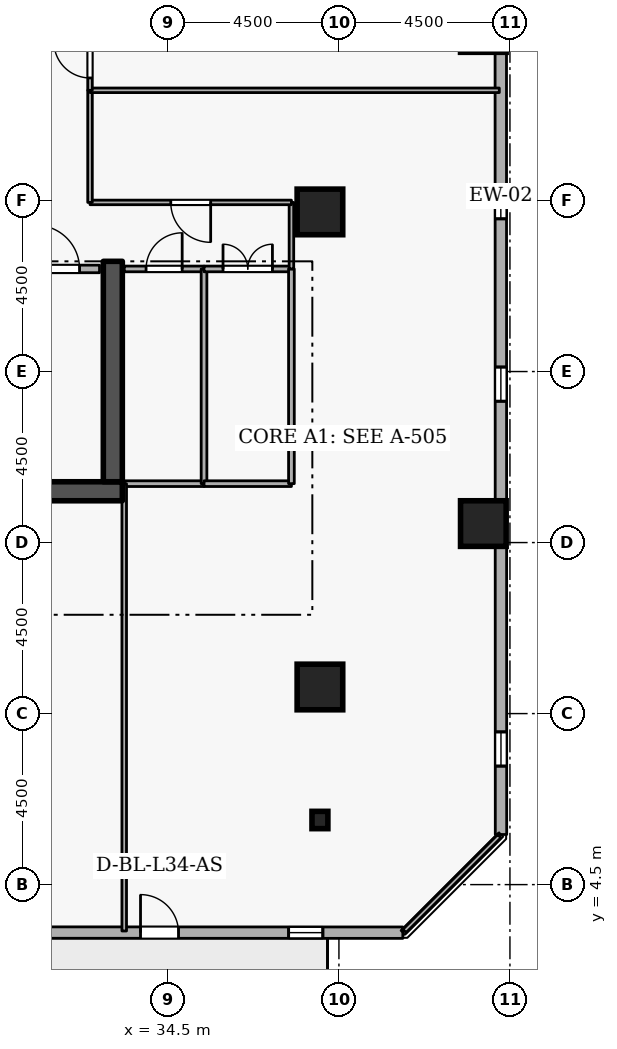
"""IFC4 building model, lengths in metres.
Left out: names, types, materials, properties, quantities, classifications, styles, units other than length and angle.
Written with IfcOpenShell. Run it as: python <this file> out.ifc"""

import sys

from ifc_helpers import new_model, si_unit, direction, frame, frame_2d, origin, origin_2d, place, context, subcontext, project, spatial, rectangle, i_section, extrude, element, fill, save


model = new_model("IFC4")
c1 = context("Model", 3, precision=1e-05, world=origin(), true_north=direction((0.0, 1.0)))
c2 = subcontext(c1, "Body", "Model", "MODEL_VIEW")
j1 = project(units=[si_unit("LENGTHUNIT", "METRE"), si_unit("PLANEANGLEUNIT", "RADIAN")], contexts=[c1])
p1 = place(None, origin())
s1 = spatial("IfcSite", under=j1, at=p1, CompositionType="ELEMENT")
p2 = place(p1, origin())
s2 = spatial("IfcBuilding", under=s1, at=p2, CompositionType="ELEMENT")
p3 = place(p2, frame((0.0, 0.0, 130.5)))
s3 = spatial("IfcBuildingStorey", under=s2, at=p3, CompositionType="ELEMENT", Elevation=130.5)
p4 = place(p3, frame((17.7, 14.85, 0.0), z_axis=(0.0, 0.0, 1.0), x_axis=(1.0, 0.0, 0.0)))
e1 = element("IfcWall", 1, at=p4, inside=s3, PredefinedType="SHEAR", context=c2, shape_type="SweptSolid", body=[
    extrude(rectangle(XDim=15.6, YDim=0.5, at=frame_2d((7.8, 0.0))), origin(), (0.0, 0.0, 1.0), 3.6),
])
p5 = place(p3, frame((33.05, 15.1, 0.0), z_axis=(0.0, 0.0, 1.0), x_axis=(0.0, 1.0, 0.0)))
e2 = element("IfcWall", 2, at=p5, inside=s3, PredefinedType="SHEAR", context=c2, shape_type="SweptSolid", body=[
    extrude(rectangle(XDim=5.8, YDim=0.5, at=frame_2d((2.9, 0.0))), origin(), (0.0, 0.0, 1.0), 3.6),
])
for number, where, z_axis, x_axis in (
    (3, (38.5, 9.7, 0.0), (0.0, 0.0, 1.0), (1.0, 0.0, 0.0)),
    (4, (42.8, 14.0, 0.0), (0.0, 0.0, 1.0), (1.0, 0.0, 0.0)),
    (5, (38.5, 22.2, 0.0), (0.0, 0.0, 1.0), (1.0, 0.0, 0.0)),
):
    element("IfcColumn", number, at=place(p3, frame(where, z_axis=z_axis, x_axis=x_axis)), inside=s3, PredefinedType="COLUMN", context=c2, shape_type="SweptSolid", body=[
        extrude(rectangle(XDim=1.2, YDim=1.2, at=origin_2d()), origin(), (0.0, 0.0, 1.0), 3.6),
    ])
p6 = place(p3, frame((38.5, 6.2, 0.0), z_axis=(0.0, 0.0, 1.0), x_axis=(1.0, 0.0, 0.0)))
e6 = element("IfcColumn", 6, at=p6, inside=s3, PredefinedType="COLUMN", context=c2, shape_type="SweptSolid", body=[
    extrude(i_section(OverallWidth=0.418, OverallDepth=0.456, WebThickness=0.042, FlangeThickness=0.067, FilletRadius=0.015, at=origin_2d()), origin(), (0.0, 0.0, 1.0), 3.6),
])
p7 = place(p3, frame((7.076, 3.244, 0.0), z_axis=(0.0, 0.0, 1.0), x_axis=(0.999999963872, -0.000268805477, 0.0)))
e7 = element("IfcWall", 7, at=p7, inside=s3, PredefinedType="STANDARD", context=c2, shape_type="SweptSolid", body=[
    extrude(rectangle(XDim=33.605, YDim=0.3, at=frame_2d((16.802, 0.0))), origin(), (0.0, 0.0, 1.0), 2.7),
])
p8 = place(p7, frame((26.702, 0.0, 0.0)))
e8 = element("IfcOpeningElement", 8, at=p8, cuts=e7, PredefinedType="OPENING", context=c2, shape_type="SweptSolid", body=[
    extrude(rectangle(XDim=1.0, YDim=2.08, at=frame_2d((0.5, 1.04))), frame((0.0, 0.16, 0.0), z_axis=(0.0, -1.0, 0.0), x_axis=(1.0, 0.0, 0.0)), (0.0, 0.0, 1.0), 0.32),
])
p9 = place(p7, frame((1.8, 0.0, 0.72)))
e9 = element("IfcOpeningElement", 9, at=p9, cuts=e7, PredefinedType="OPENING", context=c2, shape_type="SweptSolid", body=[
    extrude(rectangle(XDim=0.9, YDim=1.75, at=frame_2d((0.45, 0.875))), frame((0.0, 0.16, 0.0), z_axis=(0.0, -1.0, 0.0), x_axis=(1.0, 0.0, 0.0)), (0.0, 0.0, 1.0), 0.32),
])
p10 = place(p7, frame((6.6, 0.0, 0.72)))
e10 = element("IfcOpeningElement", 10, at=p10, cuts=e7, PredefinedType="OPENING", context=c2, shape_type="SweptSolid", body=[
    extrude(rectangle(XDim=0.9, YDim=1.75, at=frame_2d((0.45, 0.875))), frame((0.0, 0.16, 0.0), z_axis=(0.0, -1.0, 0.0), x_axis=(1.0, 0.0, 0.0)), (0.0, 0.0, 1.0), 0.32),
])
p11 = place(p7, frame((11.4, 0.0, 0.72)))
e11 = element("IfcOpeningElement", 11, at=p11, cuts=e7, PredefinedType="OPENING", context=c2, shape_type="SweptSolid", body=[
    extrude(rectangle(XDim=0.9, YDim=1.75, at=frame_2d((0.45, 0.875))), frame((0.0, 0.16, 0.0), z_axis=(0.0, -1.0, 0.0), x_axis=(1.0, 0.0, 0.0)), (0.0, 0.0, 1.0), 0.32),
])
p12 = place(p7, frame((16.2, 0.0, 0.72)))
e12 = element("IfcOpeningElement", 12, at=p12, cuts=e7, PredefinedType="OPENING", context=c2, shape_type="SweptSolid", body=[
    extrude(rectangle(XDim=0.9, YDim=1.75, at=frame_2d((0.45, 0.875))), frame((0.0, 0.16, 0.0), z_axis=(0.0, -1.0, 0.0), x_axis=(1.0, 0.0, 0.0)), (0.0, 0.0, 1.0), 0.32),
])
p13 = place(p7, frame((21.0, 0.0, 0.72)))
e13 = element("IfcOpeningElement", 13, at=p13, cuts=e7, PredefinedType="OPENING", context=c2, shape_type="SweptSolid", body=[
    extrude(rectangle(XDim=0.9, YDim=1.75, at=frame_2d((0.45, 0.875))), frame((0.0, 0.16, 0.0), z_axis=(0.0, -1.0, 0.0), x_axis=(1.0, 0.0, 0.0)), (0.0, 0.0, 1.0), 0.32),
])
p14 = place(p7, frame((30.6, 0.0, 0.72)))
e14 = element("IfcOpeningElement", 14, at=p14, cuts=e7, PredefinedType="OPENING", context=c2, shape_type="SweptSolid", body=[
    extrude(rectangle(XDim=0.9, YDim=1.75, at=frame_2d((0.45, 0.875))), frame((0.0, 0.16, 0.0), z_axis=(0.0, -1.0, 0.0), x_axis=(1.0, 0.0, 0.0)), (0.0, 0.0, 1.0), 0.32),
])
p15 = place(p3, frame((43.265, 5.819, 0.0), z_axis=(0.0, 0.0, 1.0), x_axis=(-0.000268805477, 0.999999963872, 0.0)))
e15 = element("IfcWall", 15, at=p15, inside=s3, PredefinedType="STANDARD", context=c2, shape_type="SweptSolid", body=[
    extrude(rectangle(XDim=33.605, YDim=0.3, at=frame_2d((16.802, 0.0))), origin(), (0.0, 0.0, 1.0), 2.7),
])
p16 = place(p15, frame((1.8, 0.0, 0.72)))
e16 = element("IfcOpeningElement", 16, at=p16, cuts=e15, PredefinedType="OPENING", context=c2, shape_type="SweptSolid", body=[
    extrude(rectangle(XDim=0.9, YDim=1.75, at=frame_2d((0.45, 0.875))), frame((0.0, 0.16, 0.0), z_axis=(0.0, -1.0, 0.0), x_axis=(1.0, 0.0, 0.0)), (0.0, 0.0, 1.0), 0.32),
])
p17 = place(p15, frame((11.4, 0.0, 0.72)))
e17 = element("IfcOpeningElement", 17, at=p17, cuts=e15, PredefinedType="OPENING", context=c2, shape_type="SweptSolid", body=[
    extrude(rectangle(XDim=0.9, YDim=1.75, at=frame_2d((0.45, 0.875))), frame((0.0, 0.16, 0.0), z_axis=(0.0, -1.0, 0.0), x_axis=(1.0, 0.0, 0.0)), (0.0, 0.0, 1.0), 0.32),
])
p18 = place(p15, frame((16.2, 0.0, 0.72)))
e18 = element("IfcOpeningElement", 18, at=p18, cuts=e15, PredefinedType="OPENING", context=c2, shape_type="SweptSolid", body=[
    extrude(rectangle(XDim=0.9, YDim=1.75, at=frame_2d((0.45, 0.875))), frame((0.0, 0.16, 0.0), z_axis=(0.0, -1.0, 0.0), x_axis=(1.0, 0.0, 0.0)), (0.0, 0.0, 1.0), 0.32),
])
p19 = place(p15, frame((25.8, 0.0, 0.72)))
e19 = element("IfcOpeningElement", 19, at=p19, cuts=e15, PredefinedType="OPENING", context=c2, shape_type="SweptSolid", body=[
    extrude(rectangle(XDim=0.9, YDim=1.75, at=frame_2d((0.45, 0.875))), frame((0.0, 0.16, 0.0), z_axis=(0.0, -1.0, 0.0), x_axis=(1.0, 0.0, 0.0)), (0.0, 0.0, 1.0), 0.32),
])
p20 = place(p15, frame((30.6, 0.0, 0.72)))
e20 = element("IfcOpeningElement", 20, at=p20, cuts=e15, PredefinedType="OPENING", context=c2, shape_type="SweptSolid", body=[
    extrude(rectangle(XDim=0.9, YDim=1.75, at=frame_2d((0.45, 0.875))), frame((0.0, 0.16, 0.0), z_axis=(0.0, -1.0, 0.0), x_axis=(1.0, 0.0, 0.0)), (0.0, 0.0, 1.0), 0.32),
])
p21 = place(p3, frame((30.5, 20.7, 0.0), z_axis=(0.0, 0.0, 1.0), x_axis=(1.0, 0.0, 0.0)))
e21 = element("IfcWall", 21, at=p21, inside=s3, PredefinedType="STANDARD", context=c2, shape_type="SweptSolid", body=[
    extrude(rectangle(XDim=2.2, YDim=0.2, at=frame_2d((1.1, 0.0))), origin(), (0.0, 0.0, 1.0), 3.34),
])
p22 = place(p21, frame((0.525, 0.0, 0.0)))
e22 = element("IfcOpeningElement", 22, at=p22, cuts=e21, PredefinedType="OPENING", context=c2, shape_type="SweptSolid", body=[
    extrude(rectangle(XDim=1.15, YDim=2.1, at=frame_2d((0.575, 1.05))), frame((0.0, 0.11, 0.0), z_axis=(0.0, -1.0, 0.0), x_axis=(1.0, 0.0, 0.0)), (0.0, 0.0, 1.0), 0.22),
])
p23 = place(p3, frame((35.45, 15.05, 0.0), z_axis=(0.0, 0.0, 1.0), x_axis=(-1.0, 0.0, 0.0)))
e23 = element("IfcWall", 23, at=p23, inside=s3, PredefinedType="PARTITIONING", context=c2, shape_type="SweptSolid", body=[
    extrude(rectangle(XDim=2.1, YDim=0.15, at=frame_2d((1.05, 0.0))), origin(), (0.0, 0.0, 1.0), 3.34),
])
p24 = place(p3, frame((33.35, 20.7, 0.0), z_axis=(0.0, 0.0, 1.0), x_axis=(1.0, 0.0, 0.0)))
e24 = element("IfcWall", 24, at=p24, inside=s3, PredefinedType="PARTITIONING", context=c2, shape_type="SweptSolid", body=[
    extrude(rectangle(XDim=2.1, YDim=0.15, at=frame_2d((1.05, 0.0))), origin(), (0.0, 0.0, 1.0), 3.34),
])
p25 = place(p24, frame((0.575, 0.0, 0.0)))
e25 = element("IfcOpeningElement", 25, at=p25, cuts=e24, PredefinedType="OPENING", context=c2, shape_type="SweptSolid", body=[
    extrude(rectangle(XDim=0.95, YDim=2.1, at=frame_2d((0.475, 1.05))), frame((0.0, 0.085, 0.0), z_axis=(0.0, -1.0, 0.0), x_axis=(1.0, 0.0, 0.0)), (0.0, 0.0, 1.0), 0.17),
])
p26 = place(p3, frame((35.45, 20.7, 0.0), z_axis=(0.0, 0.0, 1.0), x_axis=(0.0, -1.0, 0.0)))
e26 = element("IfcWall", 26, at=p26, inside=s3, PredefinedType="PARTITIONING", context=c2, shape_type="SweptSolid", body=[
    extrude(rectangle(XDim=5.65, YDim=0.15, at=frame_2d((2.825, 0.0))), origin(), (0.0, 0.0, 1.0), 3.34),
])
p27 = place(p3, frame((37.75, 15.05, 0.0), z_axis=(0.0, 0.0, 1.0), x_axis=(-1.0, 0.0, 0.0)))
e27 = element("IfcWall", 27, at=p27, inside=s3, PredefinedType="PARTITIONING", context=c2, shape_type="SweptSolid", body=[
    extrude(rectangle(XDim=2.3, YDim=0.15, at=frame_2d((1.15, 0.0))), origin(), (0.0, 0.0, 1.0), 3.34),
])
p28 = place(p3, frame((35.45, 20.7, 0.0), z_axis=(0.0, 0.0, 1.0), x_axis=(1.0, 0.0, 0.0)))
e28 = element("IfcWall", 28, at=p28, inside=s3, PredefinedType="PARTITIONING", context=c2, shape_type="SweptSolid", body=[
    extrude(rectangle(XDim=2.3, YDim=0.15, at=frame_2d((1.15, 0.0))), origin(), (0.0, 0.0, 1.0), 3.34),
])
p29 = place(p28, frame((0.5, 0.0, 0.0)))
e29 = element("IfcOpeningElement", 29, at=p29, cuts=e28, PredefinedType="OPENING", context=c2, shape_type="SweptSolid", body=[
    extrude(rectangle(XDim=1.3, YDim=2.12, at=frame_2d((0.65, 1.06))), frame((0.0, 0.085, 0.0), z_axis=(0.0, -1.0, 0.0), x_axis=(1.0, 0.0, 0.0)), (0.0, 0.0, 1.0), 0.17),
])
p30 = place(p3, frame((37.75, 20.7, 0.0), z_axis=(0.0, 0.0, 1.0), x_axis=(0.0, -1.0, 0.0)))
e30 = element("IfcWall", 30, at=p30, inside=s3, PredefinedType="PARTITIONING", context=c2, shape_type="SweptSolid", body=[
    extrude(rectangle(XDim=5.65, YDim=0.15, at=frame_2d((2.825, 0.0))), origin(), (0.0, 0.0, 1.0), 3.34),
])
p31 = place(p3, frame((33.35, 3.28, 0.0), z_axis=(0.0, 0.0, 1.0), x_axis=(0.0, 1.0, 0.0)))
e31 = element("IfcWall", 31, at=p31, inside=s3, PredefinedType="PARTITIONING", context=c2, shape_type="SweptSolid", body=[
    extrude(rectangle(XDim=11.77, YDim=0.12, at=frame_2d((5.885, 0.0))), origin(), (0.0, 0.0, 1.0), 2.545),
])
p32 = place(p3, frame((37.75, 20.7, 0.0), z_axis=(0.0, 0.0, 1.0), x_axis=(0.0, 1.0, 0.0)))
e32 = element("IfcWall", 32, at=p32, inside=s3, PredefinedType="PARTITIONING", context=c2, shape_type="SweptSolid", body=[
    extrude(rectangle(XDim=1.75, YDim=0.12, at=frame_2d((0.875, 0.0))), origin(), (0.0, 0.0, 1.0), 3.34),
])
p33 = place(p3, frame((37.75, 22.45, 0.0), z_axis=(0.0, 0.0, 1.0), x_axis=(-1.0, 0.0, 0.0)))
e33 = element("IfcWall", 33, at=p33, inside=s3, PredefinedType="PARTITIONING", context=c2, shape_type="SweptSolid", body=[
    extrude(rectangle(XDim=5.3, YDim=0.12, at=frame_2d((2.65, 0.0))), origin(), (0.0, 0.0, 1.0), 3.34),
])
p34 = place(p33, frame((2.125, 0.0, 0.0)))
e34 = element("IfcOpeningElement", 34, at=p34, cuts=e33, PredefinedType="OPENING", context=c2, shape_type="SweptSolid", body=[
    extrude(rectangle(XDim=1.05, YDim=2.1, at=frame_2d((0.525, 1.05))), frame((0.0, 0.07, 0.0), z_axis=(0.0, -1.0, 0.0), x_axis=(1.0, 0.0, 0.0)), (0.0, 0.0, 1.0), 0.14),
])
p35 = place(p3, frame((32.45, 22.45, 0.0), z_axis=(0.0, 0.0, 1.0), x_axis=(0.0, 1.0, 0.0)))
e35 = element("IfcWall", 35, at=p35, inside=s3, PredefinedType="PARTITIONING", context=c2, shape_type="SweptSolid", body=[
    extrude(rectangle(XDim=2.95, YDim=0.12, at=frame_2d((1.475, 0.0))), origin(), (0.0, 0.0, 1.0), 3.34),
])
p36 = place(p3, frame((32.45, 25.4, 0.0), z_axis=(0.0, 0.0, 1.0), x_axis=(1.0, 0.0, 0.0)))
e36 = element("IfcWall", 36, at=p36, inside=s3, PredefinedType="PARTITIONING", context=c2, shape_type="SweptSolid", body=[
    extrude(rectangle(XDim=10.77, YDim=0.12, at=frame_2d((5.385, 0.0))), origin(), (0.0, 0.0, 1.0), 3.34),
])
p37 = place(p3, frame((43.22, 5.775, 0.0), z_axis=(0.0, 0.0, 1.0), x_axis=(-0.707106781187, -0.707106781187, 0.0)))
e37 = element("IfcWall", 37, at=p37, inside=s3, PredefinedType="PARTITIONING", context=c2, shape_type="SweptSolid", body=[
    extrude(rectangle(XDim=3.528, YDim=0.12, at=frame_2d((1.764, 0.0))), origin(), (0.0, 0.0, 1.0), 3.34),
])
p38 = place(p3, frame((32.45, 25.4, 0.0), z_axis=(0.0, 0.0, 1.0), x_axis=(0.0, 1.0, 0.0)))
e38 = element("IfcWall", 38, at=p38, inside=s3, PredefinedType="PARTITIONING", context=c2, shape_type="SweptSolid", body=[
    extrude(rectangle(XDim=1.6, YDim=0.12, at=frame_2d((0.8, 0.0))), origin(), (0.0, 0.0, 1.0), 3.34),
])
p39 = place(p38, frame((0.325, 0.0, 0.0)))
e39 = element("IfcOpeningElement", 39, at=p39, cuts=e38, PredefinedType="OPENING", context=c2, shape_type="SweptSolid", body=[
    extrude(rectangle(XDim=0.95, YDim=2.1, at=frame_2d((0.475, 1.05))), frame((0.0, 0.07, 0.0), z_axis=(0.0, -1.0, 0.0), x_axis=(1.0, 0.0, 0.0)), (0.0, 0.0, 1.0), 0.14),
])
p40 = place(p8, origin())
e40 = element("IfcDoor", 40, at=p40, inside=s3, OperationType="SINGLE_SWING_LEFT", PredefinedType="DOOR", context=c2, shape_type="SweptSolid", body=[
    extrude(rectangle(XDim=1.0, YDim=2.08, at=frame_2d((0.5, 1.04))), frame((0.0, 0.025, 0.0), z_axis=(0.0, -1.0, 0.0), x_axis=(1.0, 0.0, 0.0)), (0.0, 0.0, 1.0), 0.05),
])
fill(e8, e40)
p41 = place(p14, origin())
e41 = element("IfcWindow", 41, at=p41, inside=s3, PartitioningType="SINGLE_PANEL", PredefinedType="WINDOW", context=c2, shape_type="SweptSolid", body=[
    extrude(rectangle(XDim=0.9, YDim=1.75, at=frame_2d((0.45, 0.875))), frame((0.0, 0.03, 0.0), z_axis=(0.0, -1.0, 0.0), x_axis=(1.0, 0.0, 0.0)), (0.0, 0.0, 1.0), 0.06),
])
fill(e14, e41)
p42 = place(p16, origin())
e42 = element("IfcWindow", 42, at=p42, inside=s3, PartitioningType="SINGLE_PANEL", PredefinedType="WINDOW", context=c2, shape_type="SweptSolid", body=[
    extrude(rectangle(XDim=0.9, YDim=1.75, at=frame_2d((0.45, 0.875))), frame((0.0, 0.03, 0.0), z_axis=(0.0, -1.0, 0.0), x_axis=(1.0, 0.0, 0.0)), (0.0, 0.0, 1.0), 0.06),
])
fill(e16, e42)
p43 = place(p17, origin())
e43 = element("IfcWindow", 43, at=p43, inside=s3, PartitioningType="SINGLE_PANEL", PredefinedType="WINDOW", context=c2, shape_type="SweptSolid", body=[
    extrude(rectangle(XDim=0.9, YDim=1.75, at=frame_2d((0.45, 0.875))), frame((0.0, 0.03, 0.0), z_axis=(0.0, -1.0, 0.0), x_axis=(1.0, 0.0, 0.0)), (0.0, 0.0, 1.0), 0.06),
])
fill(e17, e43)
p44 = place(p18, origin())
e44 = element("IfcWindow", 44, at=p44, inside=s3, PartitioningType="SINGLE_PANEL", PredefinedType="WINDOW", context=c2, shape_type="SweptSolid", body=[
    extrude(rectangle(XDim=0.9, YDim=1.75, at=frame_2d((0.45, 0.875))), frame((0.0, 0.03, 0.0), z_axis=(0.0, -1.0, 0.0), x_axis=(1.0, 0.0, 0.0)), (0.0, 0.0, 1.0), 0.06),
])
fill(e18, e44)
p45 = place(p22, origin())
e45 = element("IfcDoor", 45, at=p45, inside=s3, OperationType="SINGLE_SWING_LEFT", PredefinedType="DOOR", context=c2, shape_type="SweptSolid", body=[
    extrude(rectangle(XDim=1.15, YDim=2.1, at=frame_2d((0.575, 1.05))), frame((0.0, 0.025, 0.0), z_axis=(0.0, -1.0, 0.0), x_axis=(1.0, 0.0, 0.0)), (0.0, 0.0, 1.0), 0.05),
])
fill(e22, e45)
p46 = place(p25, origin())
e46 = element("IfcDoor", 46, at=p46, inside=s3, OperationType="SINGLE_SWING_RIGHT", PredefinedType="DOOR", context=c2, shape_type="SweptSolid", body=[
    extrude(rectangle(XDim=0.95, YDim=2.1, at=frame_2d((0.475, 1.05))), frame((0.0, 0.025, 0.0), z_axis=(0.0, -1.0, 0.0), x_axis=(1.0, 0.0, 0.0)), (0.0, 0.0, 1.0), 0.05),
])
fill(e25, e46)
p47 = place(p29, origin())
e47 = element("IfcDoor", 47, at=p47, inside=s3, OperationType="DOUBLE_DOOR_SINGLE_SWING", PredefinedType="DOOR", context=c2, shape_type="SweptSolid", body=[
    extrude(rectangle(XDim=1.3, YDim=2.12, at=frame_2d((0.65, 1.06))), frame((0.0, 0.025, 0.0), z_axis=(0.0, -1.0, 0.0), x_axis=(1.0, 0.0, 0.0)), (0.0, 0.0, 1.0), 0.05),
])
fill(e29, e47)
p48 = place(p34, origin())
e48 = element("IfcDoor", 48, at=p48, inside=s3, OperationType="SINGLE_SWING_LEFT", PredefinedType="DOOR", context=c2, shape_type="SweptSolid", body=[
    extrude(rectangle(XDim=1.05, YDim=2.1, at=frame_2d((0.525, 1.05))), frame((0.0, 0.025, 0.0), z_axis=(0.0, -1.0, 0.0), x_axis=(1.0, 0.0, 0.0)), (0.0, 0.0, 1.0), 0.05),
])
fill(e34, e48)
p49 = place(p39, origin())
e49 = element("IfcDoor", 49, at=p49, inside=s3, OperationType="SINGLE_SWING_RIGHT", PredefinedType="DOOR", context=c2, shape_type="SweptSolid", body=[
    extrude(rectangle(XDim=0.95, YDim=2.1, at=frame_2d((0.475, 1.05))), frame((0.0, 0.025, 0.0), z_axis=(0.0, -1.0, 0.0), x_axis=(1.0, 0.0, 0.0)), (0.0, 0.0, 1.0), 0.05),
])
fill(e39, e49)
save(model, sys.argv[1])
